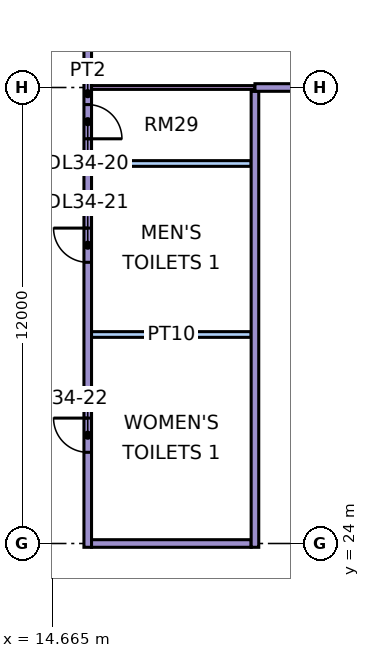
"""IFC4 building model, lengths in metres.
Left out: names, types, materials, properties, quantities, classifications, styles, units other than length and angle.
Written with IfcOpenShell. Run it as: python <this file> out.ifc"""

import sys

from ifc_helpers import new_model, si_unit, direction, frame, frame_2d, origin, place, context, subcontext, project, spatial, rectangle, extrude, element, fill, save


model = new_model("IFC4")
c1 = context("Model", 3, precision=1e-05, world=origin(), true_north=direction((0.0, 1.0)))
c2 = subcontext(c1, "Body", "Model", "MODEL_VIEW")
j1 = project(units=[si_unit("LENGTHUNIT", "METRE"), si_unit("PLANEANGLEUNIT", "RADIAN")], contexts=[c1])
p1 = place(None, origin())
s1 = spatial("IfcSite", under=j1, at=p1, CompositionType="ELEMENT")
p2 = place(p1, origin())
s2 = spatial("IfcBuilding", under=s1, at=p2, CompositionType="ELEMENT")
p3 = place(p2, frame((0.0, 0.0, 146.15)))
s3 = spatial("IfcBuildingStorey", under=s2, at=p3, CompositionType="ELEMENT", Elevation=146.15)
p4 = place(p3, frame((15.6, 23.9, 0.0), z_axis=(0.0, 0.0, 1.0), x_axis=(0.0, 1.0, 0.0)))
e1 = element("IfcWall", 1, at=p4, inside=s3, PredefinedType="PARTITIONING", context=c2, shape_type="SweptSolid", body=[
    extrude(rectangle(XDim=23.875, YDim=0.2, at=frame_2d((11.938, 0.0))), origin(), (0.0, 0.0, 1.0), 10.85),
])
p5 = place(p4, frame((14.5, 0.0, 0.0)))
e2 = element("IfcOpeningElement", 2, at=p5, cuts=e1, PredefinedType="OPENING", context=c2, shape_type="SweptSolid", body=[
    extrude(rectangle(XDim=1.0, YDim=2.1, at=frame_2d((0.5, 1.05))), frame((0.0, 0.11, 0.0), z_axis=(0.0, -1.0, 0.0), x_axis=(1.0, 0.0, 0.0)), (0.0, 0.0, 1.0), 0.22),
])
p6 = place(p4, frame((20.5, 0.0, 0.0)))
e3 = element("IfcOpeningElement", 3, at=p6, cuts=e1, PredefinedType="OPENING", context=c2, shape_type="SweptSolid", body=[
    extrude(rectangle(XDim=1.0, YDim=2.1, at=frame_2d((0.5, 1.05))), frame((0.0, 0.11, 0.0), z_axis=(0.0, -1.0, 0.0), x_axis=(1.0, 0.0, 0.0)), (0.0, 0.0, 1.0), 0.22),
])
p7 = place(p4, frame((10.75, 0.0, 0.0)))
e4 = element("IfcOpeningElement", 4, at=p7, cuts=e1, PredefinedType="OPENING", context=c2, shape_type="SweptSolid", body=[
    extrude(rectangle(XDim=0.9, YDim=2.1, at=frame_2d((0.45, 1.05))), frame((0.0, 0.11, 0.0), z_axis=(0.0, -1.0, 0.0), x_axis=(1.0, 0.0, 0.0)), (0.0, 0.0, 1.0), 0.22),
])
p8 = place(p4, frame((7.5, 0.0, 0.0)))
e5 = element("IfcOpeningElement", 5, at=p8, cuts=e1, PredefinedType="OPENING", context=c2, shape_type="SweptSolid", body=[
    extrude(rectangle(XDim=0.9, YDim=2.1, at=frame_2d((0.45, 1.05))), frame((0.0, 0.11, 0.0), z_axis=(0.0, -1.0, 0.0), x_axis=(1.0, 0.0, 0.0)), (0.0, 0.0, 1.0), 0.22),
])
p9 = place(p4, frame((2.5, 0.0, 0.0)))
e6 = element("IfcOpeningElement", 6, at=p9, cuts=e1, PredefinedType="OPENING", context=c2, shape_type="SweptSolid", body=[
    extrude(rectangle(XDim=0.9, YDim=2.1, at=frame_2d((0.45, 1.05))), frame((0.0, 0.11, 0.0), z_axis=(0.0, -1.0, 0.0), x_axis=(1.0, 0.0, 0.0)), (0.0, 0.0, 1.0), 0.22),
])
p10 = place(p3, frame((15.7, 24.0, 0.0), z_axis=(0.0, 0.0, 1.0), x_axis=(1.0, 0.0, 0.0)))
e7 = element("IfcWall", 7, at=p10, inside=s3, PredefinedType="PARTITIONING", context=c2, shape_type="SweptSolid", body=[
    extrude(rectangle(XDim=4.2, YDim=0.2, at=frame_2d((2.1, 0.0))), origin(), (0.0, 0.0, 1.0), 10.85),
])
for number, where, z_axis, x_axis in (
    (8, (15.7, 29.5, 0.0), (0.0, 0.0, 1.0), (1.0, 0.0, 0.0)),
    (9, (15.7, 34.0, 0.0), (0.0, 0.0, 1.0), (1.0, 0.0, 0.0)),
):
    element("IfcWall", number, at=place(p3, frame(where, z_axis=z_axis, x_axis=x_axis)), inside=s3, PredefinedType="PARTITIONING", context=c2, shape_type="SweptSolid", body=[
        extrude(rectangle(XDim=4.2, YDim=0.15, at=frame_2d((2.1, 0.0))), origin(), (0.0, 0.0, 1.0), 10.85),
    ])
p11 = place(p3, frame((15.7, 36.0, 0.0), z_axis=(0.0, 0.0, 1.0), x_axis=(1.0, 0.0, 0.0)))
e10 = element("IfcWall", 10, at=p11, inside=s3, PredefinedType="PARTITIONING", context=c2, shape_type="SweptSolid", body=[
    extrude(rectangle(XDim=4.3, YDim=0.1, at=frame_2d((2.15, 0.0))), origin(), (0.0, 0.0, 1.0), 10.85),
])
p12 = place(p3, frame((20.0, 23.9, 0.0), z_axis=(0.0, 0.0, 1.0), x_axis=(0.0, 1.0, 0.0)))
e11 = element("IfcWall", 11, at=p12, inside=s3, PredefinedType="PARTITIONING", context=c2, shape_type="SweptSolid", body=[
    extrude(rectangle(XDim=12.0, YDim=0.2, at=frame_2d((6.0, 0.0))), origin(), (0.0, 0.0, 1.0), 10.85),
])
p13 = place(p3, frame((20.0, 36.0, 0.0), z_axis=(0.0, 0.0, 1.0), x_axis=(1.0, 0.0, 0.0)))
e12 = element("IfcWall", 12, at=p13, inside=s3, PredefinedType="PARTITIONING", context=c2, shape_type="SweptSolid", body=[
    extrude(rectangle(XDim=4.0, YDim=0.2, at=frame_2d((2.0, 0.0))), origin(), (0.0, 0.0, 1.0), 10.85),
])
p14 = place(p7, frame((0.9, 0.0, 0.0), z_axis=(0.0, 0.0, 1.0), x_axis=(-1.0, 0.0, 0.0)))
e13 = element("IfcDoor", 13, at=p14, inside=s3, OperationType="SINGLE_SWING_LEFT", PredefinedType="DOOR", context=c2, shape_type="SweptSolid", body=[
    extrude(rectangle(XDim=0.9, YDim=2.1, at=frame_2d((0.45, 1.05))), frame((0.0, 0.025, 0.0), z_axis=(0.0, -1.0, 0.0), x_axis=(1.0, 0.0, 0.0)), (0.0, 0.0, 1.0), 0.05),
])
fill(e4, e13)
p15 = place(p8, frame((0.9, 0.0, 0.0), z_axis=(0.0, 0.0, 1.0), x_axis=(-1.0, 0.0, 0.0)))
e14 = element("IfcDoor", 14, at=p15, inside=s3, OperationType="SINGLE_SWING_RIGHT", PredefinedType="DOOR", context=c2, shape_type="SweptSolid", body=[
    extrude(rectangle(XDim=0.9, YDim=2.1, at=frame_2d((0.45, 1.05))), frame((0.0, 0.025, 0.0), z_axis=(0.0, -1.0, 0.0), x_axis=(1.0, 0.0, 0.0)), (0.0, 0.0, 1.0), 0.05),
])
fill(e5, e14)
p16 = place(p9, frame((0.9, 0.0, 0.0), z_axis=(0.0, 0.0, 1.0), x_axis=(-1.0, 0.0, 0.0)))
e15 = element("IfcDoor", 15, at=p16, inside=s3, OperationType="SINGLE_SWING_RIGHT", PredefinedType="DOOR", context=c2, shape_type="SweptSolid", body=[
    extrude(rectangle(XDim=0.9, YDim=2.1, at=frame_2d((0.45, 1.05))), frame((0.0, 0.025, 0.0), z_axis=(0.0, -1.0, 0.0), x_axis=(1.0, 0.0, 0.0)), (0.0, 0.0, 1.0), 0.05),
])
fill(e6, e15)
save(model, sys.argv[1])
